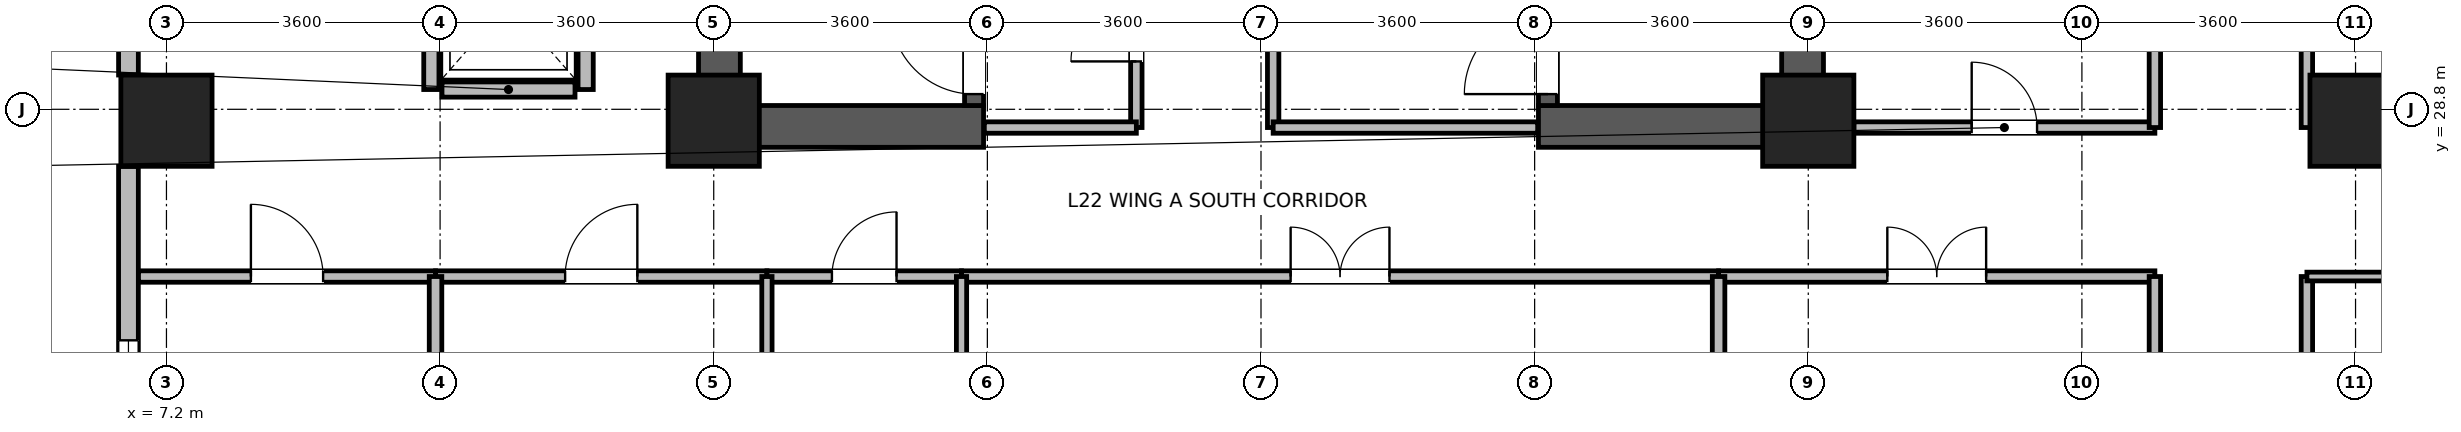
"""IFC4 building model, lengths in metres.
Left out: names, types, materials, properties, quantities, classifications, styles, units other than length and angle.
Written with IfcOpenShell. Run it as: python <this file> out.ifc"""

import sys

from ifc_helpers import new_model, si_unit, direction, frame, frame_2d, origin, origin_2d, place, context, subcontext, project, spatial, rectangle, extrude, source, transform, mapped, element, fill, save


model = new_model("IFC4")
c1 = context("Model", 3, precision=1e-05, world=origin(), true_north=direction((0.0, 1.0)))
c2 = subcontext(c1, "Body", "Model", "MODEL_VIEW")
j1 = project(units=[si_unit("LENGTHUNIT", "METRE"), si_unit("PLANEANGLEUNIT", "RADIAN")], contexts=[c1])
p1 = place(None, origin())
s1 = spatial("IfcSite", under=j1, at=p1, CompositionType="ELEMENT")
p2 = place(p1, origin())
s2 = spatial("IfcBuilding", under=s1, at=p2, CompositionType="ELEMENT")
p3 = place(p2, frame((0.0, 0.0, 89.7)))
s3 = spatial("IfcBuildingStorey", under=s2, at=p3, CompositionType="ELEMENT", Elevation=89.7)
for number, where, z_axis, x_axis in (
    (1, (14.475, 28.3, 0.0), (0.0, 0.0, 1.0), (0.0, 1.0, 0.0)),
    (2, (28.725, 28.3, 0.0), (0.0, 0.0, 1.0), (0.0, 1.0, 0.0)),
):
    element("IfcWall", number, at=place(p3, frame(where, z_axis=z_axis, x_axis=x_axis)), inside=s3, PredefinedType="SHEAR", context=c2, shape_type="SweptSolid", body=[
        extrude(rectangle(XDim=8.1, YDim=0.55, at=frame_2d((4.05, 0.0))), origin(), (0.0, 0.0, 1.0), 3.45),
    ])
for number, where, z_axis, x_axis in (
    (3, (14.75, 28.575, 0.0), (0.0, 0.0, 1.0), (1.0, 0.0, 0.0)),
    (4, (25.25, 28.575, 0.0), (0.0, 0.0, 1.0), (1.0, 0.0, 0.0)),
):
    element("IfcWall", number, at=place(p3, frame(where, z_axis=z_axis, x_axis=x_axis)), inside=s3, PredefinedType="SHEAR", context=c2, shape_type="SweptSolid", body=[
        extrude(rectangle(XDim=3.2, YDim=0.55, at=frame_2d((1.6, 0.0))), origin(), (0.0, 0.0, 1.0), 3.45),
    ])
p4 = place(p3, frame((17.825, 28.85, 0.0), z_axis=(0.0, 0.0, 1.0), x_axis=(0.0, 1.0, 0.0)))
e5 = element("IfcWall", 5, at=p4, inside=s3, PredefinedType="SHEAR", context=c2, shape_type="SweptSolid", body=[
    extrude(rectangle(XDim=7.0, YDim=0.25, at=frame_2d((3.5, 0.0))), origin(), (0.0, 0.0, 1.0), 3.45),
])
p5 = place(p4, frame((0.15, 0.0, 0.0)))
e6 = element("IfcOpeningElement", 6, at=p5, cuts=e5, PredefinedType="OPENING", context=c2, shape_type="SweptSolid", body=[
    extrude(rectangle(XDim=1.1, YDim=2.08, at=frame_2d((0.55, 1.04))), frame((0.0, 0.135, 0.0), z_axis=(0.0, -1.0, 0.0), x_axis=(1.0, 0.0, 0.0)), (0.0, 0.0, 1.0), 0.27),
])
p6 = place(p3, frame((25.375, 28.85, 0.0), z_axis=(0.0, 0.0, 1.0), x_axis=(0.0, 1.0, 0.0)))
e7 = element("IfcWall", 7, at=p6, inside=s3, PredefinedType="SHEAR", context=c2, shape_type="SweptSolid", body=[
    extrude(rectangle(XDim=7.0, YDim=0.25, at=frame_2d((3.5, 0.0))), origin(), (0.0, 0.0, 1.0), 3.45),
])
p7 = place(p6, frame((0.15, 0.0, 0.0)))
e8 = element("IfcOpeningElement", 8, at=p7, cuts=e7, PredefinedType="OPENING", context=c2, shape_type="SweptSolid", body=[
    extrude(rectangle(XDim=1.1, YDim=2.08, at=frame_2d((0.55, 1.04))), frame((0.0, 0.135, 0.0), z_axis=(0.0, -1.0, 0.0), x_axis=(1.0, 0.0, 0.0)), (0.0, 0.0, 1.0), 0.27),
])
m1 = source(origin(), c2, "Body", "SweptSolid", [
    extrude(rectangle(XDim=1.2, YDim=1.2, at=origin_2d()), origin(), (0.0, 0.0, 1.0), 3.7),
])
for number, where, z_axis, x_axis in (
    (9, (7.2, 28.65, 0.0), (0.0, 0.0, 1.0), (1.0, 0.0, 0.0)),
    (10, (14.4, 28.65, 0.0), (0.0, 0.0, 1.0), (1.0, 0.0, 0.0)),
    (11, (28.8, 28.65, 0.0), (0.0, 0.0, 1.0), (1.0, 0.0, 0.0)),
    (12, (36.0, 28.65, 0.0), (0.0, 0.0, 1.0), (1.0, 0.0, 0.0)),
):
    element("IfcColumn", number, at=place(p3, frame(where, z_axis=z_axis, x_axis=x_axis)), inside=s3, PredefinedType="COLUMN", context=c2, shape_type="MappedRepresentation", body=[
        mapped(m1, transform((0.0, 0.0, 0.0), x_axis=(1.0, 0.0, 0.0), y_axis=(0.0, 1.0, 0.0), z_axis=(0.0, 0.0, 1.0), scale=1.0)),
    ])
p8 = place(p3, frame((6.7, 29.251, 0.0), z_axis=(0.0, 0.0, 1.0), x_axis=(0.0, 1.0, 0.0)))
e13 = element("IfcWall", 13, at=p8, inside=s3, PredefinedType="STANDARD", context=c2, shape_type="SweptSolid", body=[
    extrude(rectangle(XDim=6.298, YDim=0.26, at=frame_2d((3.149, 0.0))), origin(), (0.0, 0.0, 1.0), 3.43),
])
p9 = place(p8, frame((0.675, 0.0, 0.85)))
e14 = element("IfcOpeningElement", 14, at=p9, cuts=e13, PredefinedType="OPENING", context=c2, shape_type="SweptSolid", body=[
    extrude(rectangle(XDim=1.8, YDim=1.85, at=frame_2d((0.9, 0.925))), frame((0.0, 0.14, 0.0), z_axis=(0.0, -1.0, 0.0), x_axis=(1.0, 0.0, 0.0)), (0.0, 0.0, 1.0), 0.28),
])
p10 = place(p8, frame((3.823, 0.0, 0.85)))
e15 = element("IfcOpeningElement", 15, at=p10, cuts=e13, PredefinedType="OPENING", context=c2, shape_type="SweptSolid", body=[
    extrude(rectangle(XDim=1.8, YDim=1.85, at=frame_2d((0.9, 0.925))), frame((0.0, 0.14, 0.0), z_axis=(0.0, -1.0, 0.0), x_axis=(1.0, 0.0, 0.0)), (0.0, 0.0, 1.0), 0.28),
])
p11 = place(p3, frame((6.7, 21.47, 0.0), z_axis=(0.0, 0.0, 1.0), x_axis=(0.0, 1.0, 0.0)))
e16 = element("IfcWall", 16, at=p11, inside=s3, PredefinedType="STANDARD", context=c2, shape_type="SweptSolid", body=[
    extrude(rectangle(XDim=6.579, YDim=0.26, at=frame_2d((3.29, 0.0))), origin(), (0.0, 0.0, 1.0), 3.43),
])
p12 = place(p11, frame((0.745, 0.0, 0.85)))
e17 = element("IfcOpeningElement", 17, at=p12, cuts=e16, PredefinedType="OPENING", context=c2, shape_type="SweptSolid", body=[
    extrude(rectangle(XDim=1.8, YDim=1.85, at=frame_2d((0.9, 0.925))), frame((0.0, 0.14, 0.0), z_axis=(0.0, -1.0, 0.0), x_axis=(1.0, 0.0, 0.0)), (0.0, 0.0, 1.0), 0.28),
])
p13 = place(p11, frame((3.341, 0.0, 0.85)))
e18 = element("IfcOpeningElement", 18, at=p13, cuts=e16, PredefinedType="OPENING", context=c2, shape_type="SweptSolid", body=[
    extrude(rectangle(XDim=0.95, YDim=1.75, at=frame_2d((0.475, 0.875))), frame((0.0, 0.14, 0.0), z_axis=(0.0, -1.0, 0.0), x_axis=(1.0, 0.0, 0.0)), (0.0, 0.0, 1.0), 0.28),
])
p14 = place(p3, frame((10.825, 29.06, 0.0), z_axis=(0.0, 0.0, 1.0), x_axis=(1.0, 0.0, 0.0)))
e19 = element("IfcWall", 19, at=p14, inside=s3, PredefinedType="PARTITIONING", context=c2, shape_type="SweptSolid", body=[
    extrude(rectangle(XDim=1.75, YDim=0.2, at=frame_2d((0.875, 0.0))), origin(), (0.0, 0.0, 1.0), 3.43),
])
for number, where, z_axis, x_axis in (
    (20, (10.685, 29.06, 0.0), (0.0, 0.0, 1.0), (0.0, 1.0, 0.0)),
    (21, (12.715, 29.06, 0.0), (0.0, 0.0, 1.0), (0.0, 1.0, 0.0)),
):
    element("IfcWall", number, at=place(p3, frame(where, z_axis=z_axis, x_axis=x_axis)), inside=s3, PredefinedType="PARTITIONING", context=c2, shape_type="SweptSolid", body=[
        extrude(rectangle(XDim=2.28, YDim=0.2, at=frame_2d((1.14, 0.0))), origin(), (0.0, 0.0, 1.0), 3.43),
    ])
p15 = place(p3, frame((17.66, 26.6, 0.0), z_axis=(0.0, 0.0, 1.0), x_axis=(1.0, 0.0, 0.0)))
e22 = element("IfcWall", 22, at=p15, inside=s3, PredefinedType="PARTITIONING", context=c2, shape_type="SweptSolid", body=[
    extrude(rectangle(XDim=9.96, YDim=0.15, at=frame_2d((4.98, 0.0))), origin(), (0.0, 0.0, 1.0), 3.43),
])
p16 = place(p15, frame((4.33, 0.0, 0.0)))
e23 = element("IfcOpeningElement", 23, at=p16, cuts=e22, PredefinedType="OPENING", context=c2, shape_type="SweptSolid", body=[
    extrude(rectangle(XDim=1.3, YDim=2.12, at=frame_2d((0.65, 1.06))), frame((0.0, 0.085, 0.0), z_axis=(0.0, -1.0, 0.0), x_axis=(1.0, 0.0, 0.0)), (0.0, 0.0, 1.0), 0.17),
])
p17 = place(p3, frame((35.36, 16.96, 0.0), z_axis=(0.0, 0.0, 1.0), x_axis=(0.0, 1.0, 0.0)))
e24 = element("IfcWall", 24, at=p17, inside=s3, PredefinedType="PARTITIONING", context=c2, shape_type="SweptSolid", body=[
    extrude(rectangle(XDim=9.64, YDim=0.15, at=frame_2d((4.82, 0.0))), origin(), (0.0, 0.0, 1.0), 3.43),
])
p18 = place(p17, frame((2.435, 0.0, 0.0)))
e25 = element("IfcOpeningElement", 25, at=p18, cuts=e24, PredefinedType="OPENING", context=c2, shape_type="SweptSolid", body=[
    extrude(rectangle(XDim=1.3, YDim=2.12, at=frame_2d((0.65, 1.06))), frame((0.0, 0.085, 0.0), z_axis=(0.0, -1.0, 0.0), x_axis=(1.0, 0.0, 0.0)), (0.0, 0.0, 1.0), 0.17),
])
p19 = place(p3, frame((35.36, 28.56, 0.0), z_axis=(0.0, 0.0, 1.0), x_axis=(0.0, 1.0, 0.0)))
e26 = element("IfcWall", 26, at=p19, inside=s3, PredefinedType="PARTITIONING", context=c2, shape_type="SweptSolid", body=[
    extrude(rectangle(XDim=7.68, YDim=0.15, at=frame_2d((3.84, 0.0))), origin(), (0.0, 0.0, 1.0), 3.43),
])
p20 = place(p19, frame((3.19, 0.0, 0.0)))
e27 = element("IfcOpeningElement", 27, at=p20, cuts=e26, PredefinedType="OPENING", context=c2, shape_type="SweptSolid", body=[
    extrude(rectangle(XDim=1.3, YDim=2.12, at=frame_2d((0.65, 1.06))), frame((0.0, 0.085, 0.0), z_axis=(0.0, -1.0, 0.0), x_axis=(1.0, 0.0, 0.0)), (0.0, 0.0, 1.0), 0.17),
])
p21 = place(p3, frame((27.62, 26.6, 0.0), z_axis=(0.0, 0.0, 1.0), x_axis=(1.0, 0.0, 0.0)))
e28 = element("IfcWall", 28, at=p21, inside=s3, PredefinedType="PARTITIONING", context=c2, shape_type="SweptSolid", body=[
    extrude(rectangle(XDim=5.74, YDim=0.15, at=frame_2d((2.87, 0.0))), origin(), (0.0, 0.0, 1.0), 3.43),
])
p22 = place(p21, frame((2.22, 0.0, 0.0)))
e29 = element("IfcOpeningElement", 29, at=p22, cuts=e28, PredefinedType="OPENING", context=c2, shape_type="SweptSolid", body=[
    extrude(rectangle(XDim=1.3, YDim=2.12, at=frame_2d((0.65, 1.06))), frame((0.0, 0.085, 0.0), z_axis=(0.0, -1.0, 0.0), x_axis=(1.0, 0.0, 0.0)), (0.0, 0.0, 1.0), 0.17),
])
p23 = place(p3, frame((33.36, 21.6, 0.0), z_axis=(0.0, 0.0, 1.0), x_axis=(0.0, 1.0, 0.0)))
e30 = element("IfcWall", 30, at=p23, inside=s3, PredefinedType="PARTITIONING", context=c2, shape_type="SweptSolid", body=[
    extrude(rectangle(XDim=5.0, YDim=0.15, at=frame_2d((2.5, 0.0))), origin(), (0.0, 0.0, 1.0), 3.43),
])
p24 = place(p3, frame((29.4, 28.56, 0.0), z_axis=(0.0, 0.0, 1.0), x_axis=(1.0, 0.0, 0.0)))
e31 = element("IfcWall", 31, at=p24, inside=s3, PredefinedType="PARTITIONING", context=c2, shape_type="SweptSolid", body=[
    extrude(rectangle(XDim=3.96, YDim=0.15, at=frame_2d((1.98, 0.0))), origin(), (0.0, 0.0, 1.0), 2.78),
])
p25 = place(p24, frame((1.55, 0.0, 0.0)))
e32 = element("IfcOpeningElement", 32, at=p25, cuts=e31, PredefinedType="OPENING", context=c2, shape_type="SweptSolid", body=[
    extrude(rectangle(XDim=0.86, YDim=2.02, at=frame_2d((0.43, 1.01))), frame((0.0, 0.085, 0.0), z_axis=(0.0, -1.0, 0.0), x_axis=(1.0, 0.0, 0.0)), (0.0, 0.0, 1.0), 0.17),
])
p26 = place(p3, frame((10.74, 26.6, 0.0), z_axis=(0.0, 0.0, 1.0), x_axis=(1.0, 0.0, 0.0)))
e33 = element("IfcWall", 33, at=p26, inside=s3, PredefinedType="PARTITIONING", context=c2, shape_type="SweptSolid", body=[
    extrude(rectangle(XDim=4.36, YDim=0.15, at=frame_2d((2.18, 0.0))), origin(), (0.0, 0.0, 1.0), 3.43),
])
p27 = place(p26, frame((1.705, 0.0, 0.0)))
e34 = element("IfcOpeningElement", 34, at=p27, cuts=e33, PredefinedType="OPENING", context=c2, shape_type="SweptSolid", body=[
    extrude(rectangle(XDim=0.95, YDim=2.1, at=frame_2d((0.475, 1.05))), frame((0.0, 0.085, 0.0), z_axis=(0.0, -1.0, 0.0), x_axis=(1.0, 0.0, 0.0)), (0.0, 0.0, 1.0), 0.17),
])
p28 = place(p3, frame((6.832, 26.6, 0.0), z_axis=(0.0, 0.0, 1.0), x_axis=(1.0, 0.0, 0.0)))
e35 = element("IfcWall", 35, at=p28, inside=s3, PredefinedType="PARTITIONING", context=c2, shape_type="SweptSolid", body=[
    extrude(rectangle(XDim=3.908, YDim=0.15, at=frame_2d((1.954, 0.0))), origin(), (0.0, 0.0, 1.0), 3.43),
])
p29 = place(p28, frame((1.479, 0.0, 0.0)))
e36 = element("IfcOpeningElement", 36, at=p29, cuts=e35, PredefinedType="OPENING", context=c2, shape_type="SweptSolid", body=[
    extrude(rectangle(XDim=0.95, YDim=2.1, at=frame_2d((0.475, 1.05))), frame((0.0, 0.085, 0.0), z_axis=(0.0, -1.0, 0.0), x_axis=(1.0, 0.0, 0.0)), (0.0, 0.0, 1.0), 0.17),
])
p30 = place(p3, frame((33.36, 28.56, 0.0), z_axis=(0.0, 0.0, 1.0), x_axis=(0.0, 1.0, 0.0)))
e37 = element("IfcWall", 37, at=p30, inside=s3, PredefinedType="PARTITIONING", context=c2, shape_type="SweptSolid", body=[
    extrude(rectangle(XDim=3.84, YDim=0.15, at=frame_2d((1.92, 0.0))), origin(), (0.0, 0.0, 1.0), 3.43),
])
p31 = place(p3, frame((19.96, 28.56, 0.0), z_axis=(0.0, 0.0, 1.0), x_axis=(0.0, 1.0, 0.0)))
e38 = element("IfcWall", 38, at=p31, inside=s3, PredefinedType="PARTITIONING", context=c2, shape_type="SweptSolid", body=[
    extrude(rectangle(XDim=2.6, YDim=0.15, at=frame_2d((1.3, 0.0))), origin(), (0.0, 0.0, 1.0), 3.43),
])
p32 = place(p31, frame((0.87, 0.0, 0.0)))
e39 = element("IfcOpeningElement", 39, at=p32, cuts=e38, PredefinedType="OPENING", context=c2, shape_type="SweptSolid", body=[
    extrude(rectangle(XDim=0.86, YDim=2.02, at=frame_2d((0.43, 1.01))), frame((0.0, 0.085, 0.0), z_axis=(0.0, -1.0, 0.0), x_axis=(1.0, 0.0, 0.0)), (0.0, 0.0, 1.0), 0.17),
])
p33 = place(p3, frame((15.1, 26.6, 0.0), z_axis=(0.0, 0.0, 1.0), x_axis=(1.0, 0.0, 0.0)))
e40 = element("IfcWall", 40, at=p33, inside=s3, PredefinedType="PARTITIONING", context=c2, shape_type="SweptSolid", body=[
    extrude(rectangle(XDim=2.56, YDim=0.15, at=frame_2d((1.28, 0.0))), origin(), (0.0, 0.0, 1.0), 3.43),
])
p34 = place(p33, frame((0.855, 0.0, 0.0)))
e41 = element("IfcOpeningElement", 41, at=p34, cuts=e40, PredefinedType="OPENING", context=c2, shape_type="SweptSolid", body=[
    extrude(rectangle(XDim=0.85, YDim=2.04, at=frame_2d((0.425, 1.02))), frame((0.0, 0.085, 0.0), z_axis=(0.0, -1.0, 0.0), x_axis=(1.0, 0.0, 0.0)), (0.0, 0.0, 1.0), 0.17),
])
p35 = place(p3, frame((17.96, 28.56, 0.0), z_axis=(0.0, 0.0, 1.0), x_axis=(1.0, 0.0, 0.0)))
e42 = element("IfcWall", 42, at=p35, inside=s3, PredefinedType="PARTITIONING", context=c2, shape_type="SweptSolid", body=[
    extrude(rectangle(XDim=2.0, YDim=0.15, at=frame_2d((1.0, 0.0))), origin(), (0.0, 0.0, 1.0), 2.23),
])
p36 = place(p3, frame((10.74, 21.732, 0.0), z_axis=(0.0, 0.0, 1.0), x_axis=(0.0, 1.0, 0.0)))
e43 = element("IfcWall", 43, at=p36, inside=s3, PredefinedType="PARTITIONING", context=c2, shape_type="SweptSolid", body=[
    extrude(rectangle(XDim=4.868, YDim=0.165, at=frame_2d((2.434, 0.0))), origin(), (0.0, 0.0, 1.0), 3.43),
])
for number, where, z_axis, x_axis in (
    (44, (15.1, 21.732, 0.0), (0.0, 0.0, 1.0), (0.0, 1.0, 0.0)),
    (45, (17.66, 21.732, 0.0), (0.0, 0.0, 1.0), (0.0, 1.0, 0.0)),
):
    element("IfcWall", number, at=place(p3, frame(where, z_axis=z_axis, x_axis=x_axis)), inside=s3, PredefinedType="PARTITIONING", context=c2, shape_type="SweptSolid", body=[
        extrude(rectangle(XDim=4.868, YDim=0.135, at=frame_2d((2.434, 0.0))), origin(), (0.0, 0.0, 1.0), 3.43),
    ])
p37 = place(p3, frame((27.62, 21.732, 0.0), z_axis=(0.0, 0.0, 1.0), x_axis=(0.0, 1.0, 0.0)))
e46 = element("IfcWall", 46, at=p37, inside=s3, PredefinedType="PARTITIONING", context=c2, shape_type="SweptSolid", body=[
    extrude(rectangle(XDim=4.868, YDim=0.165, at=frame_2d((2.434, 0.0))), origin(), (0.0, 0.0, 1.0), 3.43),
])
p38 = place(p3, frame((21.76, 28.56, 0.0), z_axis=(0.0, 0.0, 1.0), x_axis=(0.0, 1.0, 0.0)))
e47 = element("IfcWall", 47, at=p38, inside=s3, PredefinedType="PARTITIONING", context=c2, shape_type="SweptSolid", body=[
    extrude(rectangle(XDim=4.6, YDim=0.15, at=frame_2d((2.3, 0.0))), origin(), (0.0, 0.0, 1.0), 3.43),
])
p39 = place(p38, frame((1.55, 0.0, 0.0)))
e48 = element("IfcOpeningElement", 48, at=p39, cuts=e47, PredefinedType="OPENING", context=c2, shape_type="SweptSolid", body=[
    extrude(rectangle(XDim=1.5, YDim=2.1, at=frame_2d((0.75, 1.05))), frame((0.0, 0.085, 0.0), z_axis=(0.0, -1.0, 0.0), x_axis=(1.0, 0.0, 0.0)), (0.0, 0.0, 1.0), 0.17),
])
p40 = place(p3, frame((35.36, 26.6, 0.0), z_axis=(0.0, 0.0, 1.0), x_axis=(1.0, 0.0, 0.0)))
e49 = element("IfcWall", 49, at=p40, inside=s3, PredefinedType="PARTITIONING", context=c2, shape_type="SweptSolid", body=[
    extrude(rectangle(XDim=4.18, YDim=0.115, at=frame_2d((2.09, 0.0))), origin(), (0.0, 0.0, 1.0), 3.43),
])
p41 = place(p3, frame((21.76, 28.56, 0.0), z_axis=(0.0, 0.0, 1.0), x_axis=(1.0, 0.0, 0.0)))
e50 = element("IfcWall", 50, at=p41, inside=s3, PredefinedType="PARTITIONING", context=c2, shape_type="SweptSolid", body=[
    extrude(rectangle(XDim=3.48, YDim=0.15, at=frame_2d((1.74, 0.0))), origin(), (0.0, 0.0, 1.0), 2.23),
])
p42 = place(p13, origin())
e51 = element("IfcWindow", 51, at=p42, inside=s3, PartitioningType="SINGLE_PANEL", PredefinedType="WINDOW", context=c2, shape_type="SweptSolid", body=[
    extrude(rectangle(XDim=0.95, YDim=1.75, at=frame_2d((0.475, 0.875))), frame((0.0, 0.03, 0.0), z_axis=(0.0, -1.0, 0.0), x_axis=(1.0, 0.0, 0.0)), (0.0, 0.0, 1.0), 0.06),
])
fill(e18, e51)
p43 = place(p5, origin())
e52 = element("IfcDoor", 52, at=p43, inside=s3, OperationType="SINGLE_SWING_RIGHT", PredefinedType="DOOR", context=c2, shape_type="SweptSolid", body=[
    extrude(rectangle(XDim=1.1, YDim=2.08, at=frame_2d((0.55, 1.04))), frame((0.0, 0.025, 0.0), z_axis=(0.0, -1.0, 0.0), x_axis=(1.0, 0.0, 0.0)), (0.0, 0.0, 1.0), 0.05),
])
fill(e6, e52)
p44 = place(p7, origin())
e53 = element("IfcDoor", 53, at=p44, inside=s3, OperationType="SINGLE_SWING_LEFT", PredefinedType="DOOR", context=c2, shape_type="SweptSolid", body=[
    extrude(rectangle(XDim=1.1, YDim=2.08, at=frame_2d((0.55, 1.04))), frame((0.0, 0.025, 0.0), z_axis=(0.0, -1.0, 0.0), x_axis=(1.0, 0.0, 0.0)), (0.0, 0.0, 1.0), 0.05),
])
fill(e8, e53)
p45 = place(p16, origin())
e54 = element("IfcDoor", 54, at=p45, inside=s3, OperationType="DOUBLE_DOOR_SINGLE_SWING", PredefinedType="DOOR", context=c2, shape_type="SweptSolid", body=[
    extrude(rectangle(XDim=1.3, YDim=2.12, at=frame_2d((0.65, 1.06))), frame((0.0, 0.025, 0.0), z_axis=(0.0, -1.0, 0.0), x_axis=(1.0, 0.0, 0.0)), (0.0, 0.0, 1.0), 0.05),
])
fill(e23, e54)
p46 = place(p22, origin())
e55 = element("IfcDoor", 55, at=p46, inside=s3, OperationType="DOUBLE_DOOR_SINGLE_SWING", PredefinedType="DOOR", context=c2, shape_type="SweptSolid", body=[
    extrude(rectangle(XDim=1.3, YDim=2.12, at=frame_2d((0.65, 1.06))), frame((0.0, 0.025, 0.0), z_axis=(0.0, -1.0, 0.0), x_axis=(1.0, 0.0, 0.0)), (0.0, 0.0, 1.0), 0.05),
])
fill(e29, e55)
p47 = place(p25, origin())
e56 = element("IfcDoor", 56, at=p47, inside=s3, OperationType="SINGLE_SWING_LEFT", PredefinedType="DOOR", context=c2, shape_type="SweptSolid", body=[
    extrude(rectangle(XDim=0.86, YDim=2.02, at=frame_2d((0.43, 1.01))), frame((0.0, 0.025, 0.0), z_axis=(0.0, -1.0, 0.0), x_axis=(1.0, 0.0, 0.0)), (0.0, 0.0, 1.0), 0.05),
])
fill(e32, e56)
p48 = place(p27, origin())
e57 = element("IfcDoor", 57, at=p48, inside=s3, OperationType="SINGLE_SWING_RIGHT", PredefinedType="DOOR", context=c2, shape_type="SweptSolid", body=[
    extrude(rectangle(XDim=0.95, YDim=2.1, at=frame_2d((0.475, 1.05))), frame((0.0, 0.025, 0.0), z_axis=(0.0, -1.0, 0.0), x_axis=(1.0, 0.0, 0.0)), (0.0, 0.0, 1.0), 0.05),
])
fill(e34, e57)
p49 = place(p29, origin())
e58 = element("IfcDoor", 58, at=p49, inside=s3, OperationType="SINGLE_SWING_LEFT", PredefinedType="DOOR", context=c2, shape_type="SweptSolid", body=[
    extrude(rectangle(XDim=0.95, YDim=2.1, at=frame_2d((0.475, 1.05))), frame((0.0, 0.025, 0.0), z_axis=(0.0, -1.0, 0.0), x_axis=(1.0, 0.0, 0.0)), (0.0, 0.0, 1.0), 0.05),
])
fill(e36, e58)
p50 = place(p32, origin())
e59 = element("IfcDoor", 59, at=p50, inside=s3, OperationType="SINGLE_SWING_LEFT", PredefinedType="DOOR", context=c2, shape_type="SweptSolid", body=[
    extrude(rectangle(XDim=0.86, YDim=2.02, at=frame_2d((0.43, 1.01))), frame((0.0, 0.025, 0.0), z_axis=(0.0, -1.0, 0.0), x_axis=(1.0, 0.0, 0.0)), (0.0, 0.0, 1.0), 0.05),
])
fill(e39, e59)
p51 = place(p34, origin())
e60 = element("IfcDoor", 60, at=p51, inside=s3, OperationType="SINGLE_SWING_RIGHT", PredefinedType="DOOR", context=c2, shape_type="SweptSolid", body=[
    extrude(rectangle(XDim=0.85, YDim=2.04, at=frame_2d((0.425, 1.02))), frame((0.0, 0.025, 0.0), z_axis=(0.0, -1.0, 0.0), x_axis=(1.0, 0.0, 0.0)), (0.0, 0.0, 1.0), 0.05),
])
fill(e41, e60)
save(model, sys.argv[1])
